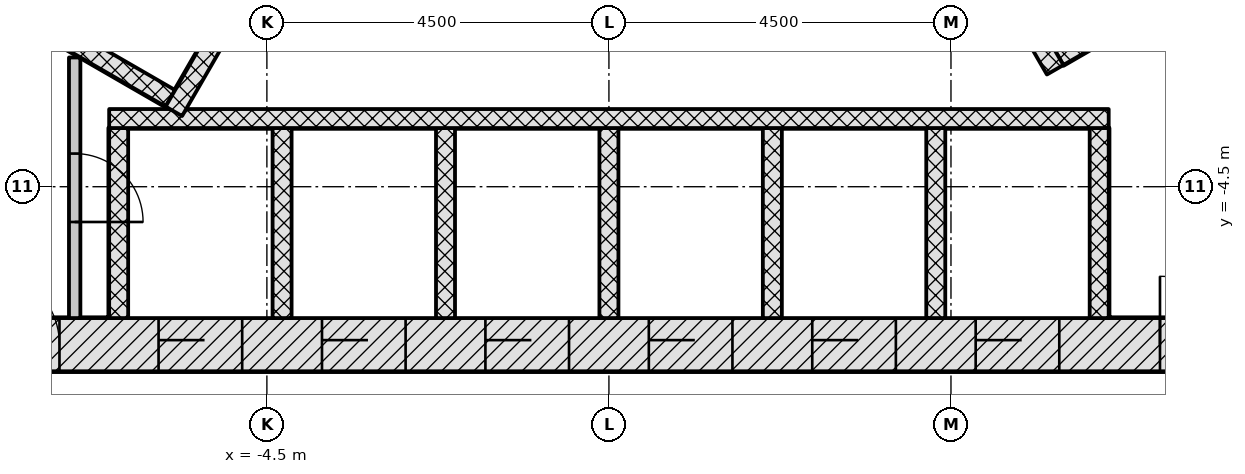
"""IFC4 building model, lengths in metres.
Left out: names, types, materials, properties, quantities, classifications, styles, units other than length and angle.
Written with IfcOpenShell. Run it as: python <this file> out.ifc"""

import sys

from ifc_helpers import new_model, si_unit, direction, frame, frame_2d, origin, place, context, subcontext, project, spatial, rectangle, extrude, element, fill, save


model = new_model("IFC4")
c1 = context("Model", 3, precision=1e-05, world=origin(), true_north=direction((0.0, 1.0)))
c2 = subcontext(c1, "Body", "Model", "MODEL_VIEW")
j1 = project(units=[si_unit("LENGTHUNIT", "METRE"), si_unit("PLANEANGLEUNIT", "RADIAN")], contexts=[c1])
p1 = place(None, origin())
s1 = spatial("IfcSite", under=j1, at=p1, CompositionType="ELEMENT")
p2 = place(p1, origin())
s2 = spatial("IfcBuilding", under=s1, at=p2, CompositionType="ELEMENT")
p3 = place(p2, frame((0.0, 0.0, 134.7)))
s3 = spatial("IfcBuildingStorey", under=s2, at=p3, CompositionType="ELEMENT", Elevation=134.7)
p4 = place(p3, frame((-9.229, -6.578, -0.3), z_axis=(0.0, 0.0, 1.0), x_axis=(1.0, 0.0, 0.0)))
e1 = element("IfcWall", 1, at=p4, inside=s3, PredefinedType="SHEAR", context=c2, shape_type="SweptSolid", body=[
    extrude(rectangle(XDim=18.458, YDim=0.7, at=frame_2d((9.229, 0.0))), origin(), (0.0, 0.0, 1.0), 5.5),
])
p5 = place(p4, frame((3.304, 0.0, 0.3)))
e2 = element("IfcOpeningElement", 2, at=p5, cuts=e1, PredefinedType="OPENING", context=c2, shape_type="SweptSolid", body=[
    extrude(rectangle(XDim=1.1, YDim=2.1, at=frame_2d((0.55, 1.05))), frame((0.0, 0.36, 0.0), z_axis=(0.0, -1.0, 0.0), x_axis=(1.0, 0.0, 0.0)), (0.0, 0.0, 1.0), 0.72),
])
p6 = place(p4, frame((5.454, 0.0, 0.3)))
e3 = element("IfcOpeningElement", 3, at=p6, cuts=e1, PredefinedType="OPENING", context=c2, shape_type="SweptSolid", body=[
    extrude(rectangle(XDim=1.1, YDim=2.1, at=frame_2d((0.55, 1.05))), frame((0.0, 0.36, 0.0), z_axis=(0.0, -1.0, 0.0), x_axis=(1.0, 0.0, 0.0)), (0.0, 0.0, 1.0), 0.72),
])
p7 = place(p4, frame((7.604, 0.0, 0.3)))
e4 = element("IfcOpeningElement", 4, at=p7, cuts=e1, PredefinedType="OPENING", context=c2, shape_type="SweptSolid", body=[
    extrude(rectangle(XDim=1.1, YDim=2.1, at=frame_2d((0.55, 1.05))), frame((0.0, 0.36, 0.0), z_axis=(0.0, -1.0, 0.0), x_axis=(1.0, 0.0, 0.0)), (0.0, 0.0, 1.0), 0.72),
])
p8 = place(p4, frame((9.754, 0.0, 0.3)))
e5 = element("IfcOpeningElement", 5, at=p8, cuts=e1, PredefinedType="OPENING", context=c2, shape_type="SweptSolid", body=[
    extrude(rectangle(XDim=1.1, YDim=2.1, at=frame_2d((0.55, 1.05))), frame((0.0, 0.36, 0.0), z_axis=(0.0, -1.0, 0.0), x_axis=(1.0, 0.0, 0.0)), (0.0, 0.0, 1.0), 0.72),
])
p9 = place(p4, frame((11.904, 0.0, 0.3)))
e6 = element("IfcOpeningElement", 6, at=p9, cuts=e1, PredefinedType="OPENING", context=c2, shape_type="SweptSolid", body=[
    extrude(rectangle(XDim=1.1, YDim=2.1, at=frame_2d((0.55, 1.05))), frame((0.0, 0.36, 0.0), z_axis=(0.0, -1.0, 0.0), x_axis=(1.0, 0.0, 0.0)), (0.0, 0.0, 1.0), 0.72),
])
p10 = place(p4, frame((14.054, 0.0, 0.3)))
e7 = element("IfcOpeningElement", 7, at=p10, cuts=e1, PredefinedType="OPENING", context=c2, shape_type="SweptSolid", body=[
    extrude(rectangle(XDim=1.1, YDim=2.1, at=frame_2d((0.55, 1.05))), frame((0.0, 0.36, 0.0), z_axis=(0.0, -1.0, 0.0), x_axis=(1.0, 0.0, 0.0)), (0.0, 0.0, 1.0), 0.72),
])
p11 = place(p4, frame((1.0, 0.0, 0.3)))
e8 = element("IfcOpeningElement", 8, at=p11, cuts=e1, PredefinedType="OPENING", context=c2, shape_type="SweptSolid", body=[
    extrude(rectangle(XDim=1.0, YDim=2.1, at=frame_2d((0.5, 1.05))), frame((0.0, 0.36, 0.0), z_axis=(0.0, -1.0, 0.0), x_axis=(1.0, 0.0, 0.0)), (0.0, 0.0, 1.0), 0.72),
])
p12 = place(p4, frame((16.479, 0.0, 0.3)))
e9 = element("IfcOpeningElement", 9, at=p12, cuts=e1, PredefinedType="OPENING", context=c2, shape_type="SweptSolid", body=[
    extrude(rectangle(XDim=0.9, YDim=2.1, at=frame_2d((0.45, 1.05))), frame((0.0, 0.36, 0.0), z_axis=(0.0, -1.0, 0.0), x_axis=(1.0, 0.0, 0.0)), (0.0, 0.0, 1.0), 0.72),
])
p13 = place(p3, frame((10.311, -4.703, -0.3), z_axis=(0.0, 0.0, 1.0), x_axis=(-0.500001446645, 0.866024568562, 0.0)))
e10 = element("IfcWall", 10, at=p13, inside=s3, PredefinedType="SHEAR", context=c2, shape_type="SweptSolid", body=[
    extrude(rectangle(XDim=18.458, YDim=0.7, at=frame_2d((9.229, 0.0))), origin(), (0.0, 0.0, 1.0), 5.5),
])
p14 = place(p13, frame((4.379, 0.0, 0.3)))
e11 = element("IfcOpeningElement", 11, at=p14, cuts=e10, PredefinedType="OPENING", context=c2, shape_type="SweptSolid", body=[
    extrude(rectangle(XDim=1.1, YDim=2.1, at=frame_2d((0.55, 1.05))), frame((0.0, 0.36, 0.0), z_axis=(0.0, -1.0, 0.0), x_axis=(1.0, 0.0, 0.0)), (0.0, 0.0, 1.0), 0.72),
])
p15 = place(p13, frame((6.529, 0.0, 0.3)))
e12 = element("IfcOpeningElement", 12, at=p15, cuts=e10, PredefinedType="OPENING", context=c2, shape_type="SweptSolid", body=[
    extrude(rectangle(XDim=1.1, YDim=2.1, at=frame_2d((0.55, 1.05))), frame((0.0, 0.36, 0.0), z_axis=(0.0, -1.0, 0.0), x_axis=(1.0, 0.0, 0.0)), (0.0, 0.0, 1.0), 0.72),
])
p16 = place(p13, frame((8.679, 0.0, 0.3)))
e13 = element("IfcOpeningElement", 13, at=p16, cuts=e10, PredefinedType="OPENING", context=c2, shape_type="SweptSolid", body=[
    extrude(rectangle(XDim=1.1, YDim=2.1, at=frame_2d((0.55, 1.05))), frame((0.0, 0.36, 0.0), z_axis=(0.0, -1.0, 0.0), x_axis=(1.0, 0.0, 0.0)), (0.0, 0.0, 1.0), 0.72),
])
p17 = place(p13, frame((10.829, 0.0, 0.3)))
e14 = element("IfcOpeningElement", 14, at=p17, cuts=e10, PredefinedType="OPENING", context=c2, shape_type="SweptSolid", body=[
    extrude(rectangle(XDim=1.1, YDim=2.1, at=frame_2d((0.55, 1.05))), frame((0.0, 0.36, 0.0), z_axis=(0.0, -1.0, 0.0), x_axis=(1.0, 0.0, 0.0)), (0.0, 0.0, 1.0), 0.72),
])
p18 = place(p13, frame((12.979, 0.0, 0.3)))
e15 = element("IfcOpeningElement", 15, at=p18, cuts=e10, PredefinedType="OPENING", context=c2, shape_type="SweptSolid", body=[
    extrude(rectangle(XDim=1.1, YDim=2.1, at=frame_2d((0.55, 1.05))), frame((0.0, 0.36, 0.0), z_axis=(0.0, -1.0, 0.0), x_axis=(1.0, 0.0, 0.0)), (0.0, 0.0, 1.0), 0.72),
])
p19 = place(p3, frame((-1.083, 11.281, -0.3), z_axis=(0.0, 0.0, 1.0), x_axis=(-0.500001446645, -0.866024568562, 0.0)))
e16 = element("IfcWall", 16, at=p19, inside=s3, PredefinedType="SHEAR", context=c2, shape_type="SweptSolid", body=[
    extrude(rectangle(XDim=18.458, YDim=0.7, at=frame_2d((9.229, 0.0))), origin(), (0.0, 0.0, 1.0), 5.5),
])
p20 = place(p19, frame((4.029, 0.0, 0.3)))
e17 = element("IfcOpeningElement", 17, at=p20, cuts=e16, PredefinedType="OPENING", context=c2, shape_type="SweptSolid", body=[
    extrude(rectangle(XDim=1.4, YDim=2.1, at=frame_2d((0.7, 1.05))), frame((0.0, 0.36, 0.0), z_axis=(0.0, -1.0, 0.0), x_axis=(1.0, 0.0, 0.0)), (0.0, 0.0, 1.0), 0.72),
])
p21 = place(p19, frame((6.579, 0.0, 0.3)))
e18 = element("IfcOpeningElement", 18, at=p21, cuts=e16, PredefinedType="OPENING", context=c2, shape_type="SweptSolid", body=[
    extrude(rectangle(XDim=1.4, YDim=2.1, at=frame_2d((0.7, 1.05))), frame((0.0, 0.36, 0.0), z_axis=(0.0, -1.0, 0.0), x_axis=(1.0, 0.0, 0.0)), (0.0, 0.0, 1.0), 0.72),
])
p22 = place(p19, frame((8.979, 0.0, 0.3)))
e19 = element("IfcOpeningElement", 19, at=p22, cuts=e16, PredefinedType="OPENING", context=c2, shape_type="SweptSolid", body=[
    extrude(rectangle(XDim=1.2, YDim=2.1, at=frame_2d((0.6, 1.05))), frame((0.0, 0.36, 0.0), z_axis=(0.0, -1.0, 0.0), x_axis=(1.0, 0.0, 0.0)), (0.0, 0.0, 1.0), 0.72),
])
p23 = place(p19, frame((11.029, 0.0, 0.3)))
e20 = element("IfcOpeningElement", 20, at=p23, cuts=e16, PredefinedType="OPENING", context=c2, shape_type="SweptSolid", body=[
    extrude(rectangle(XDim=1.2, YDim=2.1, at=frame_2d((0.6, 1.05))), frame((0.0, 0.36, 0.0), z_axis=(0.0, -1.0, 0.0), x_axis=(1.0, 0.0, 0.0)), (0.0, 0.0, 1.0), 0.72),
])
for number, where, z_axis, x_axis in (
    (21, (-6.45, -6.228, -0.3), (0.0, 0.0, 1.0), (0.0, 1.0, 0.0)),
    (22, (-4.3, -6.228, -0.3), (0.0, 0.0, 1.0), (0.0, 1.0, 0.0)),
    (23, (-2.15, -6.228, -0.3), (0.0, 0.0, 1.0), (0.0, 1.0, 0.0)),
    (24, (0.0, -6.228, -0.3), (0.0, 0.0, 1.0), (0.0, 1.0, 0.0)),
    (25, (2.15, -6.228, -0.3), (0.0, 0.0, 1.0), (0.0, 1.0, 0.0)),
    (26, (4.3, -6.228, -0.3), (0.0, 0.0, 1.0), (0.0, 1.0, 0.0)),
    (27, (6.45, -6.228, -0.3), (0.0, 0.0, 1.0), (0.0, 1.0, 0.0)),
):
    element("IfcWall", number, at=place(p3, frame(where, z_axis=z_axis, x_axis=x_axis)), inside=s3, PredefinedType="PARTITIONING", context=c2, shape_type="SweptSolid", body=[
        extrude(rectangle(XDim=2.5, YDim=0.25, at=frame_2d((1.25, 0.0))), origin(), (0.0, 0.0, 1.0), 5.5),
    ])
p24 = place(p3, frame((-6.575, -3.603, 0.0), z_axis=(0.0, 0.0, 1.0), x_axis=(1.0, 0.0, 0.0)))
e28 = element("IfcWall", 28, at=p24, inside=s3, PredefinedType="PARTITIONING", context=c2, shape_type="SweptSolid", body=[
    extrude(rectangle(XDim=13.15, YDim=0.25, at=frame_2d((6.575, 0.0))), origin(), (0.0, 0.0, 1.0), 5.2),
])
p25 = place(p3, frame((8.081, -1.541, -0.3), z_axis=(0.0, 0.0, 1.0), x_axis=(-0.866022959057, -0.500004234368, 0.0)))
e29 = element("IfcWall", 29, at=p25, inside=s3, PredefinedType="PARTITIONING", context=c2, shape_type="SweptSolid", body=[
    extrude(rectangle(XDim=2.5, YDim=0.25, at=frame_2d((1.25, 0.0))), origin(), (0.0, 0.0, 1.0), 5.5),
])
p26 = place(p3, frame((5.87, -2.961, 0.0), z_axis=(0.0, 0.0, 1.0), x_axis=(-0.50000615651, 0.866021849293, 0.0)))
e30 = element("IfcWall", 30, at=p26, inside=s3, PredefinedType="PARTITIONING", context=c2, shape_type="SweptSolid", body=[
    extrude(rectangle(XDim=11.0, YDim=0.25, at=frame_2d((5.5, 0.0))), origin(), (0.0, 0.0, 1.0), 5.2),
])
p27 = place(p3, frame((-8.281, -1.887, -0.3), z_axis=(0.0, 0.0, 1.0), x_axis=(0.866032775405, -0.499987231761, 0.0)))
e31 = element("IfcWall", 31, at=p27, inside=s3, PredefinedType="PARTITIONING", context=c2, shape_type="SweptSolid", body=[
    extrude(rectangle(XDim=2.9, YDim=0.25, at=frame_2d((1.45, 0.0))), origin(), (0.0, 0.0, 1.0), 5.5),
])
p28 = place(p3, frame((0.176, 6.711, 0.0), z_axis=(0.0, 0.0, 1.0), x_axis=(-0.500004227369, -0.866022963098, 0.0)))
e32 = element("IfcWall", 32, at=p28, inside=s3, PredefinedType="PARTITIONING", context=c2, shape_type="SweptSolid", body=[
    extrude(rectangle(XDim=11.8, YDim=0.25, at=frame_2d((5.9, 0.0))), origin(), (0.0, 0.0, 1.0), 5.2),
])
p29 = place(p3, frame((-7.029, -2.8, 0.0), z_axis=(0.0, 0.0, 1.0), x_axis=(0.0, -1.0, 0.0)))
e33 = element("IfcWall", 33, at=p29, inside=s3, PredefinedType="PARTITIONING", context=c2, shape_type="SweptSolid", body=[
    extrude(rectangle(XDim=3.428, YDim=0.15, at=frame_2d((1.714, 0.0))), origin(), (0.0, 0.0, 1.0), 5.2),
])
p30 = place(p29, frame((1.264, 0.0, 0.0)))
e34 = element("IfcOpeningElement", 34, at=p30, cuts=e33, PredefinedType="OPENING", context=c2, shape_type="SweptSolid", body=[
    extrude(rectangle(XDim=0.9, YDim=2.1, at=frame_2d((0.45, 1.05))), frame((0.0, 0.085, 0.0), z_axis=(0.0, -1.0, 0.0), x_axis=(1.0, 0.0, 0.0)), (0.0, 0.0, 1.0), 0.17),
])
p31 = place(p3, frame((7.377, 11.079, 0.0), z_axis=(0.0, 0.0, 1.0), x_axis=(0.500006395474, -0.866021711325, 0.0)))
e35 = element("IfcWall", 35, at=p31, inside=s3, PredefinedType="PARTITIONING", context=c2, shape_type="SweptSolid", body=[
    extrude(rectangle(XDim=25.529, YDim=0.15, at=frame_2d((12.765, 0.0))), origin(), (0.0, 0.0, 1.0), 4.647),
])
p32 = place(p31, frame((17.541, 0.0, 0.0)))
e36 = element("IfcOpeningElement", 36, at=p32, cuts=e35, PredefinedType="OPENING", context=c2, shape_type="SweptSolid", body=[
    extrude(rectangle(XDim=1.0, YDim=2.1, at=frame_2d((0.5, 1.05))), frame((0.0, 0.085, 0.0), z_axis=(0.0, -1.0, 0.0), x_axis=(1.0, 0.0, 0.0)), (0.0, 0.0, 1.0), 0.17),
])
p33 = place(p31, frame((7.71, 0.0, 0.0)))
e37 = element("IfcOpeningElement", 37, at=p33, cuts=e35, PredefinedType="OPENING", context=c2, shape_type="SweptSolid", body=[
    extrude(rectangle(XDim=1.0, YDim=2.1, at=frame_2d((0.5, 1.05))), frame((0.0, 0.085, 0.0), z_axis=(0.0, -1.0, 0.0), x_axis=(1.0, 0.0, 0.0)), (0.0, 0.0, 1.0), 0.17),
])
p34 = place(p31, frame((3.311, 0.0, 0.0)))
e38 = element("IfcOpeningElement", 38, at=p34, cuts=e35, PredefinedType="OPENING", context=c2, shape_type="SweptSolid", body=[
    extrude(rectangle(XDim=1.0, YDim=2.1, at=frame_2d((0.5, 1.05))), frame((0.0, 0.085, 0.0), z_axis=(0.0, -1.0, 0.0), x_axis=(1.0, 0.0, 0.0)), (0.0, 0.0, 1.0), 0.17),
])
p35 = place(p5, origin())
e39 = element("IfcDoor", 39, at=p35, inside=s3, OperationType="DOUBLE_DOOR_SLIDING", PredefinedType="DOOR", context=c2, shape_type="SweptSolid", body=[
    extrude(rectangle(XDim=1.1, YDim=2.1, at=frame_2d((0.55, 1.05))), frame((0.0, 0.025, 0.0), z_axis=(0.0, -1.0, 0.0), x_axis=(1.0, 0.0, 0.0)), (0.0, 0.0, 1.0), 0.05),
])
fill(e2, e39)
p36 = place(p6, origin())
e40 = element("IfcDoor", 40, at=p36, inside=s3, OperationType="DOUBLE_DOOR_SLIDING", PredefinedType="DOOR", context=c2, shape_type="SweptSolid", body=[
    extrude(rectangle(XDim=1.1, YDim=2.1, at=frame_2d((0.55, 1.05))), frame((0.0, 0.025, 0.0), z_axis=(0.0, -1.0, 0.0), x_axis=(1.0, 0.0, 0.0)), (0.0, 0.0, 1.0), 0.05),
])
fill(e3, e40)
p37 = place(p7, origin())
e41 = element("IfcDoor", 41, at=p37, inside=s3, OperationType="DOUBLE_DOOR_SLIDING", PredefinedType="DOOR", context=c2, shape_type="SweptSolid", body=[
    extrude(rectangle(XDim=1.1, YDim=2.1, at=frame_2d((0.55, 1.05))), frame((0.0, 0.025, 0.0), z_axis=(0.0, -1.0, 0.0), x_axis=(1.0, 0.0, 0.0)), (0.0, 0.0, 1.0), 0.05),
])
fill(e4, e41)
p38 = place(p8, origin())
e42 = element("IfcDoor", 42, at=p38, inside=s3, OperationType="DOUBLE_DOOR_SLIDING", PredefinedType="DOOR", context=c2, shape_type="SweptSolid", body=[
    extrude(rectangle(XDim=1.1, YDim=2.1, at=frame_2d((0.55, 1.05))), frame((0.0, 0.025, 0.0), z_axis=(0.0, -1.0, 0.0), x_axis=(1.0, 0.0, 0.0)), (0.0, 0.0, 1.0), 0.05),
])
fill(e5, e42)
p39 = place(p9, origin())
e43 = element("IfcDoor", 43, at=p39, inside=s3, OperationType="DOUBLE_DOOR_SLIDING", PredefinedType="DOOR", context=c2, shape_type="SweptSolid", body=[
    extrude(rectangle(XDim=1.1, YDim=2.1, at=frame_2d((0.55, 1.05))), frame((0.0, 0.025, 0.0), z_axis=(0.0, -1.0, 0.0), x_axis=(1.0, 0.0, 0.0)), (0.0, 0.0, 1.0), 0.05),
])
fill(e6, e43)
p40 = place(p10, origin())
e44 = element("IfcDoor", 44, at=p40, inside=s3, OperationType="DOUBLE_DOOR_SLIDING", PredefinedType="DOOR", context=c2, shape_type="SweptSolid", body=[
    extrude(rectangle(XDim=1.1, YDim=2.1, at=frame_2d((0.55, 1.05))), frame((0.0, 0.025, 0.0), z_axis=(0.0, -1.0, 0.0), x_axis=(1.0, 0.0, 0.0)), (0.0, 0.0, 1.0), 0.05),
])
fill(e7, e44)
p41 = place(p11, origin())
e45 = element("IfcDoor", 45, at=p41, inside=s3, OperationType="SINGLE_SWING_LEFT", PredefinedType="DOOR", context=c2, shape_type="SweptSolid", body=[
    extrude(rectangle(XDim=1.0, YDim=2.1, at=frame_2d((0.5, 1.05))), frame((0.0, 0.075, 0.0), z_axis=(0.0, -1.0, 0.0), x_axis=(1.0, 0.0, 0.0)), (0.0, 0.0, 1.0), 0.15),
])
fill(e8, e45)
p42 = place(p12, origin())
e46 = element("IfcDoor", 46, at=p42, inside=s3, OperationType="SINGLE_SWING_LEFT", PredefinedType="DOOR", context=c2, shape_type="SweptSolid", body=[
    extrude(rectangle(XDim=0.9, YDim=2.1, at=frame_2d((0.45, 1.05))), frame((0.0, 0.075, 0.0), z_axis=(0.0, -1.0, 0.0), x_axis=(1.0, 0.0, 0.0)), (0.0, 0.0, 1.0), 0.15),
])
fill(e9, e46)
p43 = place(p30, origin())
e47 = element("IfcDoor", 47, at=p43, inside=s3, OperationType="SINGLE_SWING_RIGHT", PredefinedType="DOOR", context=c2, shape_type="SweptSolid", body=[
    extrude(rectangle(XDim=0.9, YDim=2.1, at=frame_2d((0.45, 1.05))), frame((0.0, 0.025, 0.0), z_axis=(0.0, -1.0, 0.0), x_axis=(1.0, 0.0, 0.0)), (0.0, 0.0, 1.0), 0.05),
])
fill(e34, e47)
save(model, sys.argv[1])
